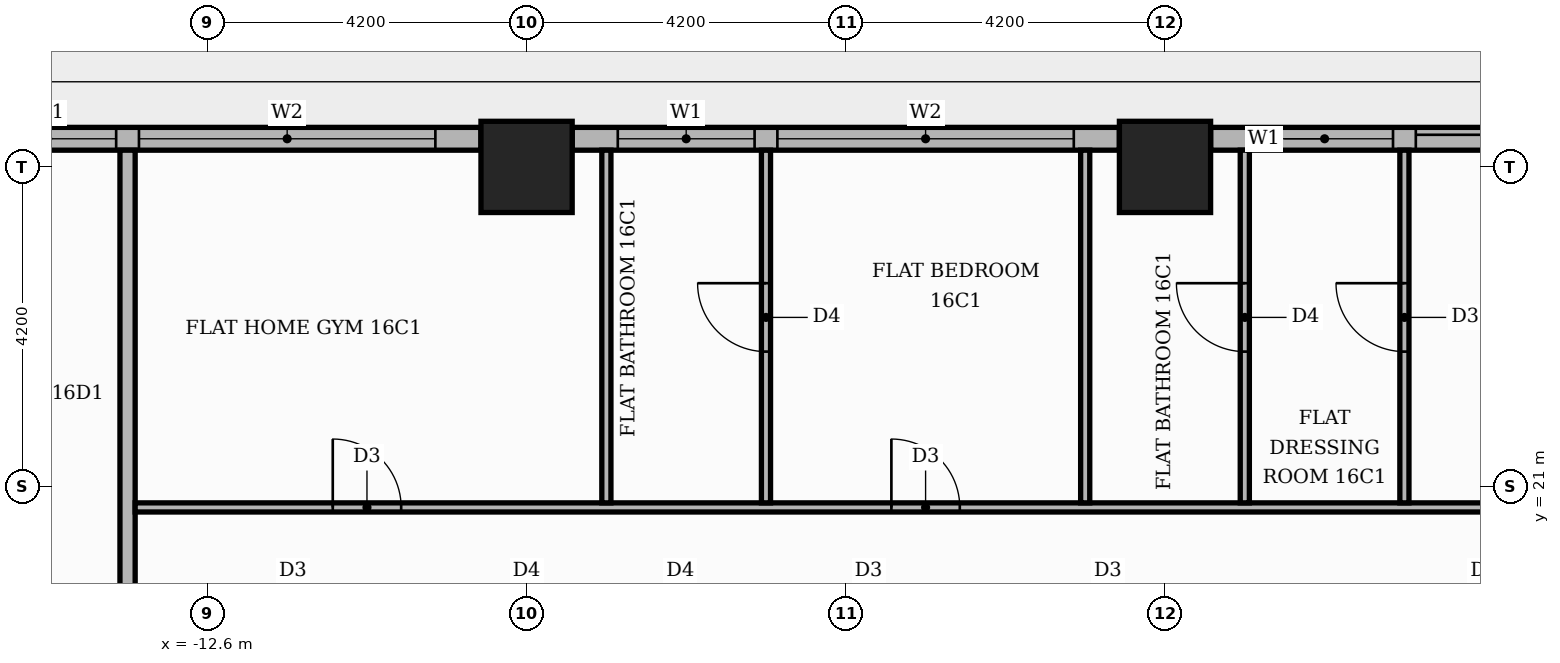
"""IFC4 building model, lengths in metres.
Left out: names, types, materials, properties, quantities, classifications, styles, units other than length and angle.
Written with IfcOpenShell. Run it as: python <this file> out.ifc"""

import sys

from ifc_helpers import new_model, si_unit, direction, frame, frame_2d, origin, origin_2d, place, context, subcontext, project, spatial, rectangle, extrude, element, fill, save


model = new_model("IFC4")
c1 = context("Model", 3, precision=1e-05, world=origin(), true_north=direction((0.0, 1.0)))
c2 = subcontext(c1, "Body", "Model", "MODEL_VIEW")
j1 = project(units=[si_unit("LENGTHUNIT", "METRE"), si_unit("PLANEANGLEUNIT", "RADIAN")], contexts=[c1])
p1 = place(None, origin())
s1 = spatial("IfcSite", under=j1, at=p1, CompositionType="ELEMENT")
p2 = place(p1, origin())
s2 = spatial("IfcBuilding", under=s1, at=p2, CompositionType="ELEMENT")
p3 = place(p2, frame((0.0, 0.0, 69.9)))
s3 = spatial("IfcBuildingStorey", under=s2, at=p3, CompositionType="ELEMENT", Elevation=69.9)
for number, where, z_axis, x_axis in (
    (1, (0.0, 25.2, 0.0), (0.0, 0.0, 1.0), (1.0, 0.0, 0.0)),
    (2, (-8.4, 25.2, 0.0), (0.0, 0.0, 1.0), (1.0, 0.0, 0.0)),
):
    element("IfcColumn", number, at=place(p3, frame(where, z_axis=z_axis, x_axis=x_axis)), inside=s3, PredefinedType="COLUMN", context=c2, shape_type="SweptSolid", body=[
        extrude(rectangle(XDim=1.2, YDim=1.2, at=origin_2d()), origin(), (0.0, 0.0, 1.0), 3.9),
    ])
p4 = place(p3, frame((7.8, 25.57, 0.0), z_axis=(0.0, 0.0, 1.0), x_axis=(-1.0, 0.0, 0.0)))
e3 = element("IfcWall", 3, at=p4, inside=s3, PredefinedType="STANDARD", context=c2, shape_type="SweptSolid", body=[
    extrude(rectangle(XDim=7.2, YDim=0.3, at=frame_2d((3.6, 0.0))), origin(), (0.0, 0.0, 1.0), 3.4),
])
p5 = place(p4, frame((0.6, 0.0, 0.0)))
e4 = element("IfcOpeningElement", 4, at=p5, cuts=e3, PredefinedType="OPENING", context=c2, shape_type="SweptSolid", body=[
    extrude(rectangle(XDim=3.9, YDim=2.4, at=frame_2d((1.95, 1.2))), frame((0.0, 0.16, 0.0), z_axis=(0.0, -1.0, 0.0), x_axis=(1.0, 0.0, 0.0)), (0.0, 0.0, 1.0), 0.32),
])
p6 = place(p4, frame((4.8, 0.0, 0.9)))
e5 = element("IfcOpeningElement", 5, at=p6, cuts=e3, PredefinedType="OPENING", context=c2, shape_type="SweptSolid", body=[
    extrude(rectangle(XDim=1.8, YDim=2.1, at=frame_2d((0.9, 1.05))), frame((0.0, 0.16, 0.0), z_axis=(0.0, -1.0, 0.0), x_axis=(1.0, 0.0, 0.0)), (0.0, 0.0, 1.0), 0.32),
])
p7 = place(p3, frame((-0.6, 25.57, 0.0), z_axis=(0.0, 0.0, 1.0), x_axis=(-1.0, 0.0, 0.0)))
e6 = element("IfcWall", 6, at=p7, inside=s3, PredefinedType="STANDARD", context=c2, shape_type="SweptSolid", body=[
    extrude(rectangle(XDim=7.2, YDim=0.3, at=frame_2d((3.6, 0.0))), origin(), (0.0, 0.0, 1.0), 3.4),
])
p8 = place(p7, frame((0.6, 0.0, 0.9)))
e7 = element("IfcOpeningElement", 7, at=p8, cuts=e6, PredefinedType="OPENING", context=c2, shape_type="SweptSolid", body=[
    extrude(rectangle(XDim=3.9, YDim=2.1, at=frame_2d((1.95, 1.05))), frame((0.0, 0.16, 0.0), z_axis=(0.0, -1.0, 0.0), x_axis=(1.0, 0.0, 0.0)), (0.0, 0.0, 1.0), 0.32),
])
p9 = place(p7, frame((4.8, 0.0, 0.9)))
e8 = element("IfcOpeningElement", 8, at=p9, cuts=e6, PredefinedType="OPENING", context=c2, shape_type="SweptSolid", body=[
    extrude(rectangle(XDim=1.8, YDim=2.1, at=frame_2d((0.9, 1.05))), frame((0.0, 0.16, 0.0), z_axis=(0.0, -1.0, 0.0), x_axis=(1.0, 0.0, 0.0)), (0.0, 0.0, 1.0), 0.32),
])
p10 = place(p3, frame((-9.0, 25.57, 0.0), z_axis=(0.0, 0.0, 1.0), x_axis=(-1.0, 0.0, 0.0)))
e9 = element("IfcWall", 9, at=p10, inside=s3, PredefinedType="STANDARD", context=c2, shape_type="SweptSolid", body=[
    extrude(rectangle(XDim=7.2, YDim=0.3, at=frame_2d((3.6, 0.0))), origin(), (0.0, 0.0, 1.0), 3.4),
])
p11 = place(p10, frame((0.6, 0.0, 0.9)))
e10 = element("IfcOpeningElement", 10, at=p11, cuts=e9, PredefinedType="OPENING", context=c2, shape_type="SweptSolid", body=[
    extrude(rectangle(XDim=3.9, YDim=2.1, at=frame_2d((1.95, 1.05))), frame((0.0, 0.16, 0.0), z_axis=(0.0, -1.0, 0.0), x_axis=(1.0, 0.0, 0.0)), (0.0, 0.0, 1.0), 0.32),
])
p12 = place(p10, frame((4.8, 0.0, 0.9)))
e11 = element("IfcOpeningElement", 11, at=p12, cuts=e9, PredefinedType="OPENING", context=c2, shape_type="SweptSolid", body=[
    extrude(rectangle(XDim=1.8, YDim=2.1, at=frame_2d((0.9, 1.05))), frame((0.0, 0.16, 0.0), z_axis=(0.0, -1.0, 0.0), x_axis=(1.0, 0.0, 0.0)), (0.0, 0.0, 1.0), 0.32),
])
p13 = place(p3, frame((-13.65, 13.75, 0.0), z_axis=(0.0, 0.0, 1.0), x_axis=(0.0, 1.0, 0.0)))
e12 = element("IfcWall", 12, at=p13, inside=s3, PredefinedType="PARTITIONING", context=c2, shape_type="SweptSolid", body=[
    extrude(rectangle(XDim=11.67, YDim=0.2, at=frame_2d((5.835, 0.0))), origin(), (0.0, 0.0, 1.0), 3.4),
])
p14 = place(p3, frame((-13.55, 20.72, 0.0), z_axis=(0.0, 0.0, 1.0), x_axis=(1.0, 0.0, 0.0)))
e13 = element("IfcWall", 13, at=p14, inside=s3, PredefinedType="PARTITIONING", context=c2, shape_type="SweptSolid", body=[
    extrude(rectangle(XDim=38.97, YDim=0.12, at=frame_2d((19.485, 0.0))), origin(), (0.0, 0.0, 1.0), 3.4),
])
p15 = place(p14, frame((25.65, 0.0, 0.0)))
e14 = element("IfcOpeningElement", 14, at=p15, cuts=e13, PredefinedType="OPENING", context=c2, shape_type="SweptSolid", body=[
    extrude(rectangle(XDim=1.0, YDim=2.1, at=frame_2d((0.5, 1.05))), frame((0.0, 0.07, 0.0), z_axis=(0.0, -1.0, 0.0), x_axis=(1.0, 0.0, 0.0)), (0.0, 0.0, 1.0), 0.14),
])
p16 = place(p14, frame((20.45, 0.0, 0.0)))
e15 = element("IfcOpeningElement", 15, at=p16, cuts=e13, PredefinedType="OPENING", context=c2, shape_type="SweptSolid", body=[
    extrude(rectangle(XDim=0.9, YDim=2.1, at=frame_2d((0.45, 1.05))), frame((0.0, 0.07, 0.0), z_axis=(0.0, -1.0, 0.0), x_axis=(1.0, 0.0, 0.0)), (0.0, 0.0, 1.0), 0.14),
])
p17 = place(p14, frame((9.95, 0.0, 0.0)))
e16 = element("IfcOpeningElement", 16, at=p17, cuts=e13, PredefinedType="OPENING", context=c2, shape_type="SweptSolid", body=[
    extrude(rectangle(XDim=0.9, YDim=2.1, at=frame_2d((0.45, 1.05))), frame((0.0, 0.07, 0.0), z_axis=(0.0, -1.0, 0.0), x_axis=(1.0, 0.0, 0.0)), (0.0, 0.0, 1.0), 0.14),
])
p18 = place(p14, frame((2.6, 0.0, 0.0)))
e17 = element("IfcOpeningElement", 17, at=p18, cuts=e13, PredefinedType="OPENING", context=c2, shape_type="SweptSolid", body=[
    extrude(rectangle(XDim=0.9, YDim=2.1, at=frame_2d((0.45, 1.05))), frame((0.0, 0.07, 0.0), z_axis=(0.0, -1.0, 0.0), x_axis=(1.0, 0.0, 0.0)), (0.0, 0.0, 1.0), 0.14),
])
p19 = place(p3, frame((-7.35, 20.78, 0.0), z_axis=(0.0, 0.0, 1.0), x_axis=(0.0, 1.0, 0.0)))
e18 = element("IfcWall", 18, at=p19, inside=s3, PredefinedType="PARTITIONING", context=c2, shape_type="SweptSolid", body=[
    extrude(rectangle(XDim=4.64, YDim=0.12, at=frame_2d((2.32, 0.0))), origin(), (0.0, 0.0, 1.0), 3.4),
])
p20 = place(p3, frame((-5.25, 20.78, 0.0), z_axis=(0.0, 0.0, 1.0), x_axis=(0.0, 1.0, 0.0)))
e19 = element("IfcWall", 19, at=p20, inside=s3, PredefinedType="PARTITIONING", context=c2, shape_type="SweptSolid", body=[
    extrude(rectangle(XDim=4.64, YDim=0.12, at=frame_2d((2.32, 0.0))), origin(), (0.0, 0.0, 1.0), 3.4),
])
p21 = place(p20, frame((1.99, 0.0, 0.0)))
e20 = element("IfcOpeningElement", 20, at=p21, cuts=e19, PredefinedType="OPENING", context=c2, shape_type="SweptSolid", body=[
    extrude(rectangle(XDim=0.9, YDim=2.1, at=frame_2d((0.45, 1.05))), frame((0.0, 0.07, 0.0), z_axis=(0.0, -1.0, 0.0), x_axis=(1.0, 0.0, 0.0)), (0.0, 0.0, 1.0), 0.14),
])
p22 = place(p3, frame((-1.05, 20.78, 0.0), z_axis=(0.0, 0.0, 1.0), x_axis=(0.0, 1.0, 0.0)))
e21 = element("IfcWall", 21, at=p22, inside=s3, PredefinedType="PARTITIONING", context=c2, shape_type="SweptSolid", body=[
    extrude(rectangle(XDim=4.64, YDim=0.12, at=frame_2d((2.32, 0.0))), origin(), (0.0, 0.0, 1.0), 3.4),
])
p23 = place(p3, frame((1.05, 20.78, 0.0), z_axis=(0.0, 0.0, 1.0), x_axis=(0.0, 1.0, 0.0)))
e22 = element("IfcWall", 22, at=p23, inside=s3, PredefinedType="PARTITIONING", context=c2, shape_type="SweptSolid", body=[
    extrude(rectangle(XDim=4.64, YDim=0.12, at=frame_2d((2.32, 0.0))), origin(), (0.0, 0.0, 1.0), 3.4),
])
p24 = place(p23, frame((1.99, 0.0, 0.0)))
e23 = element("IfcOpeningElement", 23, at=p24, cuts=e22, PredefinedType="OPENING", context=c2, shape_type="SweptSolid", body=[
    extrude(rectangle(XDim=0.9, YDim=2.1, at=frame_2d((0.45, 1.05))), frame((0.0, 0.07, 0.0), z_axis=(0.0, -1.0, 0.0), x_axis=(1.0, 0.0, 0.0)), (0.0, 0.0, 1.0), 0.14),
])
p25 = place(p3, frame((3.15, 20.78, 0.0), z_axis=(0.0, 0.0, 1.0), x_axis=(0.0, 1.0, 0.0)))
e24 = element("IfcWall", 24, at=p25, inside=s3, PredefinedType="PARTITIONING", context=c2, shape_type="SweptSolid", body=[
    extrude(rectangle(XDim=4.64, YDim=0.12, at=frame_2d((2.32, 0.0))), origin(), (0.0, 0.0, 1.0), 3.4),
])
p26 = place(p25, frame((1.99, 0.0, 0.0)))
e25 = element("IfcOpeningElement", 25, at=p26, cuts=e24, PredefinedType="OPENING", context=c2, shape_type="SweptSolid", body=[
    extrude(rectangle(XDim=0.9, YDim=2.1, at=frame_2d((0.45, 1.05))), frame((0.0, 0.07, 0.0), z_axis=(0.0, -1.0, 0.0), x_axis=(1.0, 0.0, 0.0)), (0.0, 0.0, 1.0), 0.14),
])
p27 = place(p5, origin())
e26 = element("IfcDoor", 26, at=p27, inside=s3, OperationType="SLIDING_TO_LEFT", PredefinedType="DOOR", context=c2, shape_type="SweptSolid", body=[
    extrude(rectangle(XDim=3.9, YDim=2.4, at=frame_2d((1.95, 1.2))), frame((0.0, 0.025, 0.0), z_axis=(0.0, -1.0, 0.0), x_axis=(1.0, 0.0, 0.0)), (0.0, 0.0, 1.0), 0.05),
])
fill(e4, e26)
p28 = place(p6, origin())
e27 = element("IfcWindow", 27, at=p28, inside=s3, PartitioningType="SINGLE_PANEL", PredefinedType="WINDOW", context=c2, shape_type="SweptSolid", body=[
    extrude(rectangle(XDim=1.8, YDim=2.1, at=frame_2d((0.9, 1.05))), frame((0.0, 0.03, 0.0), z_axis=(0.0, -1.0, 0.0), x_axis=(1.0, 0.0, 0.0)), (0.0, 0.0, 1.0), 0.06),
])
fill(e5, e27)
p29 = place(p8, origin())
e28 = element("IfcWindow", 28, at=p29, inside=s3, PartitioningType="SINGLE_PANEL", PredefinedType="WINDOW", context=c2, shape_type="SweptSolid", body=[
    extrude(rectangle(XDim=3.9, YDim=2.1, at=frame_2d((1.95, 1.05))), frame((0.0, 0.03, 0.0), z_axis=(0.0, -1.0, 0.0), x_axis=(1.0, 0.0, 0.0)), (0.0, 0.0, 1.0), 0.06),
])
fill(e7, e28)
p30 = place(p9, origin())
e29 = element("IfcWindow", 29, at=p30, inside=s3, PartitioningType="SINGLE_PANEL", PredefinedType="WINDOW", context=c2, shape_type="SweptSolid", body=[
    extrude(rectangle(XDim=1.8, YDim=2.1, at=frame_2d((0.9, 1.05))), frame((0.0, 0.03, 0.0), z_axis=(0.0, -1.0, 0.0), x_axis=(1.0, 0.0, 0.0)), (0.0, 0.0, 1.0), 0.06),
])
fill(e8, e29)
p31 = place(p11, origin())
e30 = element("IfcWindow", 30, at=p31, inside=s3, PartitioningType="SINGLE_PANEL", PredefinedType="WINDOW", context=c2, shape_type="SweptSolid", body=[
    extrude(rectangle(XDim=3.9, YDim=2.1, at=frame_2d((1.95, 1.05))), frame((0.0, 0.03, 0.0), z_axis=(0.0, -1.0, 0.0), x_axis=(1.0, 0.0, 0.0)), (0.0, 0.0, 1.0), 0.06),
])
fill(e10, e30)
p32 = place(p12, origin())
e31 = element("IfcWindow", 31, at=p32, inside=s3, PartitioningType="SINGLE_PANEL", PredefinedType="WINDOW", context=c2, shape_type="SweptSolid", body=[
    extrude(rectangle(XDim=1.8, YDim=2.1, at=frame_2d((0.9, 1.05))), frame((0.0, 0.03, 0.0), z_axis=(0.0, -1.0, 0.0), x_axis=(1.0, 0.0, 0.0)), (0.0, 0.0, 1.0), 0.06),
])
fill(e11, e31)
p33 = place(p26, origin())
e32 = element("IfcDoor", 32, at=p33, inside=s3, OperationType="SINGLE_SWING_RIGHT", PredefinedType="DOOR", context=c2, shape_type="SweptSolid", body=[
    extrude(rectangle(XDim=0.9, YDim=2.1, at=frame_2d((0.45, 1.05))), frame((0.0, 0.025, 0.0), z_axis=(0.0, -1.0, 0.0), x_axis=(1.0, 0.0, 0.0)), (0.0, 0.0, 1.0), 0.05),
])
fill(e25, e32)
p34 = place(p24, origin())
e33 = element("IfcDoor", 33, at=p34, inside=s3, OperationType="SINGLE_SWING_RIGHT", PredefinedType="DOOR", context=c2, shape_type="SweptSolid", body=[
    extrude(rectangle(XDim=0.9, YDim=2.1, at=frame_2d((0.45, 1.05))), frame((0.0, 0.025, 0.0), z_axis=(0.0, -1.0, 0.0), x_axis=(1.0, 0.0, 0.0)), (0.0, 0.0, 1.0), 0.05),
])
fill(e23, e33)
p35 = place(p17, origin())
e34 = element("IfcDoor", 34, at=p35, inside=s3, OperationType="SINGLE_SWING_LEFT", PredefinedType="DOOR", context=c2, shape_type="SweptSolid", body=[
    extrude(rectangle(XDim=0.9, YDim=2.1, at=frame_2d((0.45, 1.05))), frame((0.0, 0.025, 0.0), z_axis=(0.0, -1.0, 0.0), x_axis=(1.0, 0.0, 0.0)), (0.0, 0.0, 1.0), 0.05),
])
fill(e16, e34)
p36 = place(p21, origin())
e35 = element("IfcDoor", 35, at=p36, inside=s3, OperationType="SINGLE_SWING_RIGHT", PredefinedType="DOOR", context=c2, shape_type="SweptSolid", body=[
    extrude(rectangle(XDim=0.9, YDim=2.1, at=frame_2d((0.45, 1.05))), frame((0.0, 0.025, 0.0), z_axis=(0.0, -1.0, 0.0), x_axis=(1.0, 0.0, 0.0)), (0.0, 0.0, 1.0), 0.05),
])
fill(e20, e35)
p37 = place(p18, origin())
e36 = element("IfcDoor", 36, at=p37, inside=s3, OperationType="SINGLE_SWING_LEFT", PredefinedType="DOOR", context=c2, shape_type="SweptSolid", body=[
    extrude(rectangle(XDim=0.9, YDim=2.1, at=frame_2d((0.45, 1.05))), frame((0.0, 0.025, 0.0), z_axis=(0.0, -1.0, 0.0), x_axis=(1.0, 0.0, 0.0)), (0.0, 0.0, 1.0), 0.05),
])
fill(e17, e36)
save(model, sys.argv[1])
